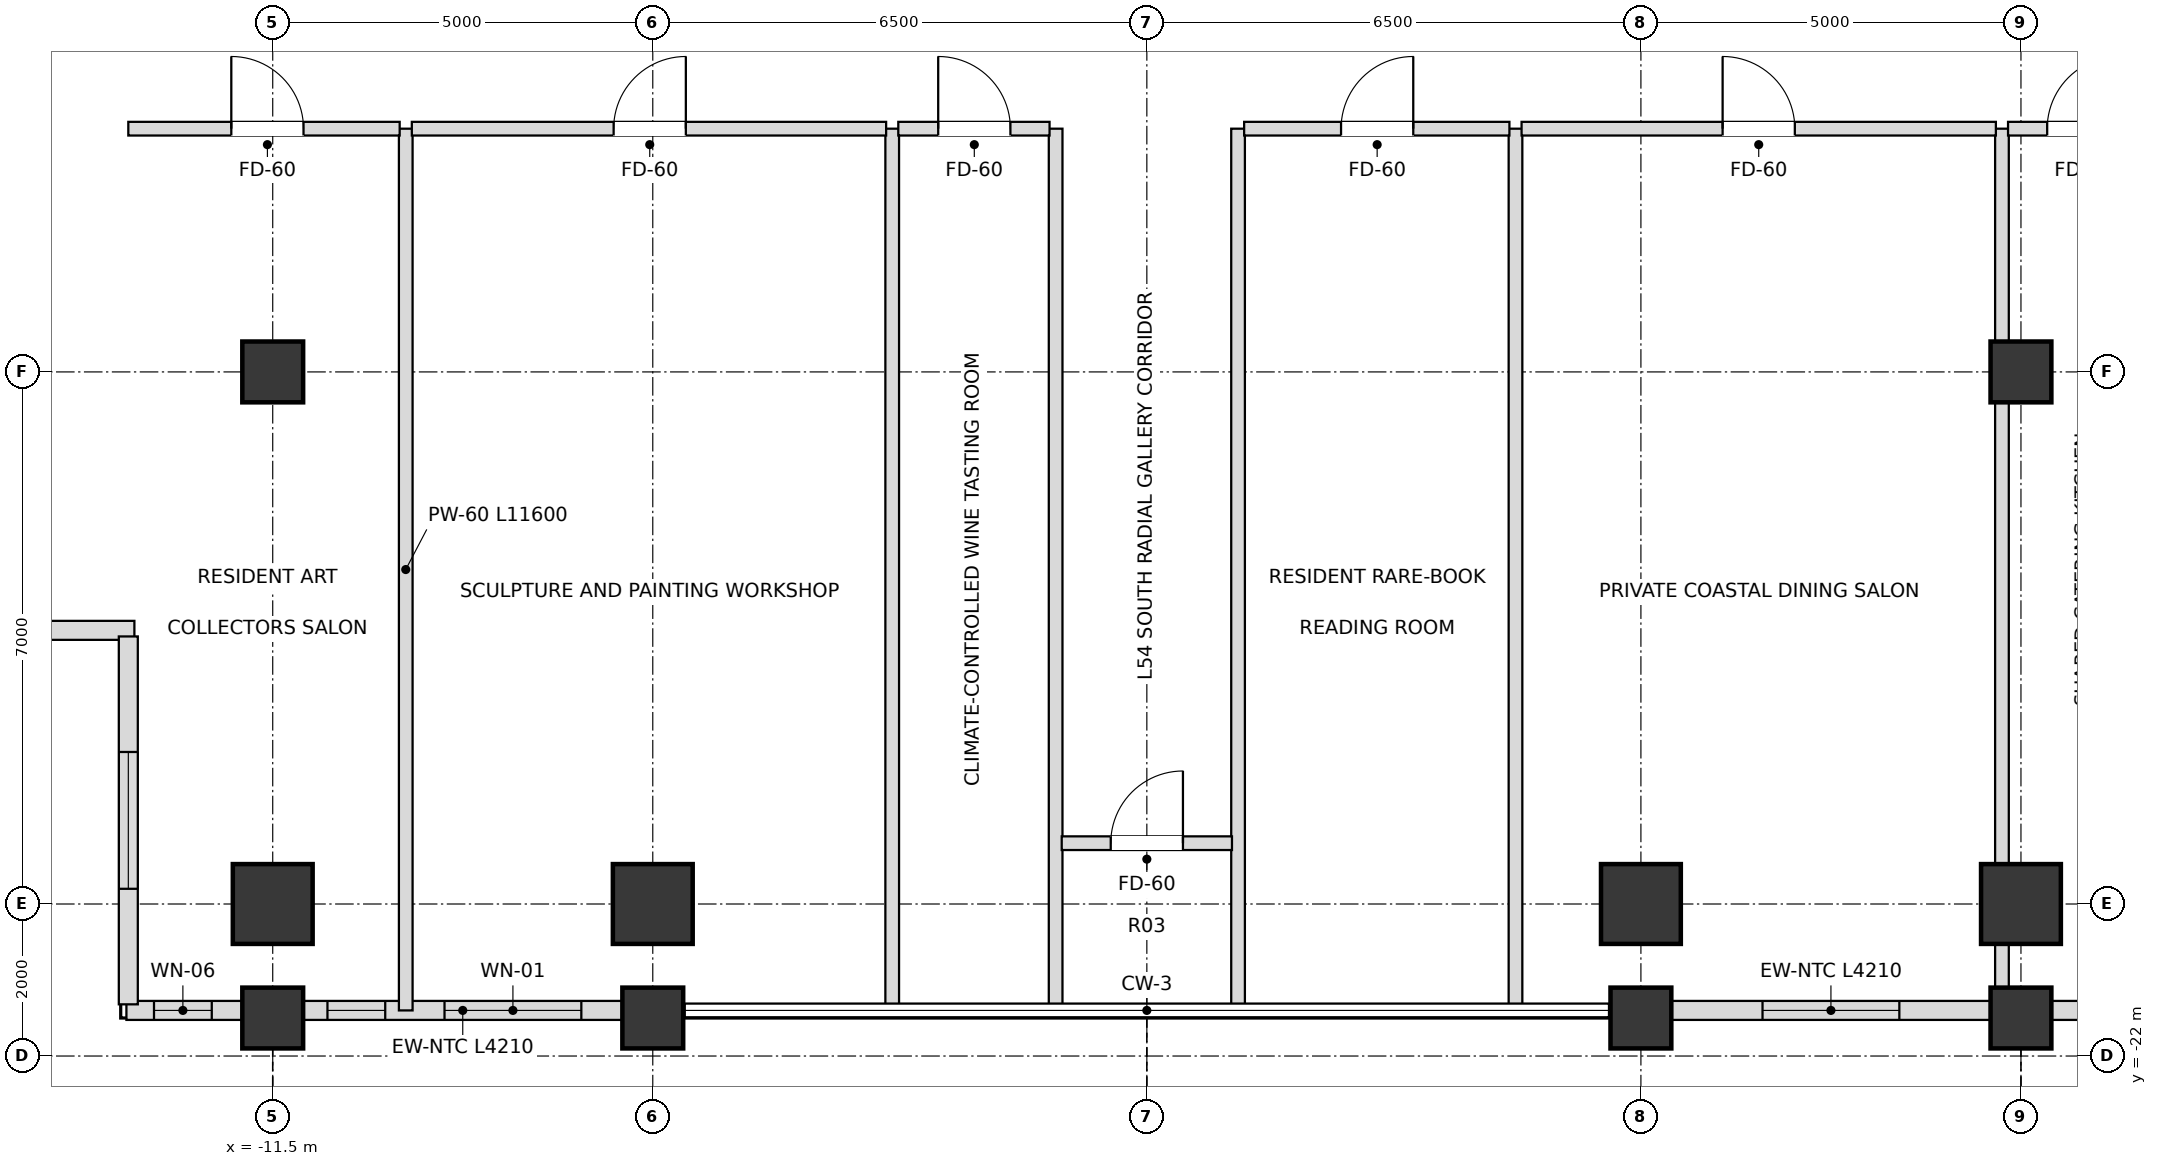
"""IFC4 building model, lengths in metres.
Left out: names, types, materials, properties, quantities, classifications, styles, units other than length and angle.
Written with IfcOpenShell. Run it as: python <this file> out.ifc"""

import sys

from ifc_helpers import new_model, si_unit, direction, frame, frame_2d, origin, origin_2d, place, context, subcontext, project, spatial, rectangle, extrude, element, fill, save


model = new_model("IFC4")
c1 = context("Model", 3, precision=1e-05, world=origin(), true_north=direction((0.0, 1.0)))
c2 = subcontext(c1, "Body", "Model", "MODEL_VIEW")
j1 = project(units=[si_unit("LENGTHUNIT", "METRE"), si_unit("PLANEANGLEUNIT", "RADIAN")], contexts=[c1])
p1 = place(None, origin())
s1 = spatial("IfcSite", under=j1, at=p1, CompositionType="ELEMENT")
p2 = place(p1, origin())
s2 = spatial("IfcBuilding", under=s1, at=p2, CompositionType="ELEMENT")
p3 = place(p2, frame((0.0, 0.0, 208.8)))
s3 = spatial("IfcBuildingStorey", under=s2, at=p3, CompositionType="ELEMENT", Elevation=208.8)
for number, where, z_axis, x_axis in (
    (1, (-11.5, -20.0, 0.0), (0.0, 0.0, 1.0), (1.0, 0.0, 0.0)),
    (2, (-6.5, -20.0, 0.0), (0.0, 0.0, 1.0), (1.0, 0.0, 0.0)),
    (3, (6.5, -20.0, 0.0), (0.0, 0.0, 1.0), (1.0, 0.0, 0.0)),
    (4, (11.5, -20.0, 0.0), (0.0, 0.0, 1.0), (1.0, 0.0, 0.0)),
):
    element("IfcColumn", number, at=place(p3, frame(where, z_axis=z_axis, x_axis=x_axis)), inside=s3, PredefinedType="USERDEFINED", context=c2, shape_type="SweptSolid", body=[
        extrude(rectangle(XDim=1.05, YDim=1.05, at=origin_2d()), origin(), (0.0, 0.0, 1.0), 3.6),
    ])
for number, where, z_axis, x_axis in (
    (5, (-11.5, -13.0, 0.0), (0.0, 0.0, 1.0), (1.0, 0.0, 0.0)),
    (6, (11.5, -13.0, 0.0), (0.0, 0.0, 1.0), (1.0, 0.0, 0.0)),
    (7, (-11.5, -21.5, 0.0), (0.0, 0.0, 1.0), (1.0, 0.0, 0.0)),
    (8, (-6.5, -21.5, 0.0), (0.0, 0.0, 1.0), (1.0, 0.0, 0.0)),
    (9, (6.5, -21.5, 0.0), (0.0, 0.0, 1.0), (1.0, 0.0, 0.0)),
    (10, (11.5, -21.5, 0.0), (0.0, 0.0, 1.0), (1.0, 0.0, 0.0)),
):
    element("IfcColumn", number, at=place(p3, frame(where, z_axis=z_axis, x_axis=x_axis)), inside=s3, PredefinedType="COLUMN", context=c2, shape_type="SweptSolid", body=[
        extrude(rectangle(XDim=0.8, YDim=0.8, at=origin_2d()), origin(), (0.0, 0.0, 1.0), 3.6),
    ])
p4 = place(p3, frame((-13.425, -21.4, 0.0), z_axis=(0.0, 0.0, 1.0), x_axis=(1.0, 0.0, 0.0)))
e11 = element("IfcWall", 11, at=p4, inside=s3, PredefinedType="SOLIDWALL", context=c2, shape_type="SweptSolid", body=[
    extrude(rectangle(XDim=1.53, YDim=0.25, at=frame_2d((0.765, 0.0))), origin(), (0.0, 0.0, 1.0), 2.59),
])
p5 = place(p4, frame((0.363, 0.0, 0.72)))
e12 = element("IfcOpeningElement", 12, at=p5, cuts=e11, PredefinedType="OPENING", context=c2, shape_type="SweptSolid", body=[
    extrude(rectangle(XDim=0.76, YDim=1.68, at=frame_2d((0.38, 0.84))), frame((0.0, 0.135, 0.0), z_axis=(0.0, -1.0, 0.0), x_axis=(1.0, 0.0, 0.0)), (0.0, 0.0, 1.0), 0.27),
])
p6 = place(p3, frame((-11.105, -21.4, 0.0), z_axis=(0.0, 0.0, 1.0), x_axis=(1.0, 0.0, 0.0)))
e13 = element("IfcWall", 13, at=p6, inside=s3, PredefinedType="SOLIDWALL", context=c2, shape_type="SweptSolid", body=[
    extrude(rectangle(XDim=4.21, YDim=0.25, at=frame_2d((2.105, 0.0))), origin(), (0.0, 0.0, 1.0), 2.59),
])
p7 = place(p6, frame((0.325, 0.0, 0.72)))
e14 = element("IfcOpeningElement", 14, at=p7, cuts=e13, PredefinedType="OPENING", context=c2, shape_type="SweptSolid", body=[
    extrude(rectangle(XDim=0.76, YDim=1.68, at=frame_2d((0.38, 0.84))), frame((0.0, 0.135, 0.0), z_axis=(0.0, -1.0, 0.0), x_axis=(1.0, 0.0, 0.0)), (0.0, 0.0, 1.0), 0.27),
])
p8 = place(p6, frame((1.865, 0.0, 0.72)))
e15 = element("IfcOpeningElement", 15, at=p8, cuts=e13, PredefinedType="OPENING", context=c2, shape_type="SweptSolid", body=[
    extrude(rectangle(XDim=1.8, YDim=1.68, at=frame_2d((0.9, 0.84))), frame((0.0, 0.135, 0.0), z_axis=(0.0, -1.0, 0.0), x_axis=(1.0, 0.0, 0.0)), (0.0, 0.0, 1.0), 0.27),
])
p9 = place(p3, frame((6.895, -21.4, 0.0), z_axis=(0.0, 0.0, 1.0), x_axis=(1.0, 0.0, 0.0)))
e16 = element("IfcWall", 16, at=p9, inside=s3, PredefinedType="SOLIDWALL", context=c2, shape_type="SweptSolid", body=[
    extrude(rectangle(XDim=4.21, YDim=0.25, at=frame_2d((2.105, 0.0))), origin(), (0.0, 0.0, 1.0), 2.59),
])
p10 = place(p9, frame((1.205, 0.0, 0.72)))
e17 = element("IfcOpeningElement", 17, at=p10, cuts=e16, PredefinedType="OPENING", context=c2, shape_type="SweptSolid", body=[
    extrude(rectangle(XDim=1.8, YDim=1.68, at=frame_2d((0.9, 0.84))), frame((0.0, 0.135, 0.0), z_axis=(0.0, -1.0, 0.0), x_axis=(1.0, 0.0, 0.0)), (0.0, 0.0, 1.0), 0.27),
])
p11 = place(p3, frame((11.895, -21.4, 0.0), z_axis=(0.0, 0.0, 1.0), x_axis=(1.0, 0.0, 0.0)))
e18 = element("IfcWall", 18, at=p11, inside=s3, PredefinedType="SOLIDWALL", context=c2, shape_type="SweptSolid", body=[
    extrude(rectangle(XDim=1.53, YDim=0.25, at=frame_2d((0.765, 0.0))), origin(), (0.0, 0.0, 1.0), 2.59),
])
p12 = place(p11, frame((0.408, 0.0, 0.72)))
e19 = element("IfcOpeningElement", 19, at=p12, cuts=e18, PredefinedType="OPENING", context=c2, shape_type="SweptSolid", body=[
    extrude(rectangle(XDim=0.76, YDim=1.68, at=frame_2d((0.38, 0.84))), frame((0.0, 0.135, 0.0), z_axis=(0.0, -1.0, 0.0), x_axis=(1.0, 0.0, 0.0)), (0.0, 0.0, 1.0), 0.27),
])
p13 = place(p3, frame((-18.48, -16.4, 0.0), z_axis=(0.0, 0.0, 1.0), x_axis=(1.0, 0.0, 0.0)))
e20 = element("IfcWall", 20, at=p13, inside=s3, PredefinedType="SOLIDWALL", context=c2, shape_type="SweptSolid", body=[
    extrude(rectangle(XDim=5.16, YDim=0.25, at=frame_2d((2.58, 0.0))), origin(), (0.0, 0.0, 1.0), 2.59),
])
p14 = place(p13, frame((1.68, 0.0, 0.72)))
e21 = element("IfcOpeningElement", 21, at=p14, cuts=e20, PredefinedType="OPENING", context=c2, shape_type="SweptSolid", body=[
    extrude(rectangle(XDim=1.8, YDim=1.68, at=frame_2d((0.9, 0.84))), frame((0.0, 0.135, 0.0), z_axis=(0.0, -1.0, 0.0), x_axis=(1.0, 0.0, 0.0)), (0.0, 0.0, 1.0), 0.27),
])
p15 = place(p3, frame((-13.4, -16.48, 0.0), z_axis=(0.0, 0.0, 1.0), x_axis=(0.0, -1.0, 0.0)))
e22 = element("IfcWall", 22, at=p15, inside=s3, PredefinedType="SOLIDWALL", context=c2, shape_type="SweptSolid", body=[
    extrude(rectangle(XDim=4.84, YDim=0.25, at=frame_2d((2.42, 0.0))), origin(), (0.0, 0.0, 1.0), 2.59),
])
p16 = place(p15, frame((1.52, 0.0, 0.72)))
e23 = element("IfcOpeningElement", 23, at=p16, cuts=e22, PredefinedType="OPENING", context=c2, shape_type="SweptSolid", body=[
    extrude(rectangle(XDim=1.8, YDim=1.68, at=frame_2d((0.9, 0.84))), frame((0.0, 0.135, 0.0), z_axis=(0.0, -1.0, 0.0), x_axis=(1.0, 0.0, 0.0)), (0.0, 0.0, 1.0), 0.27),
])
for number, where, z_axis, x_axis in (
    (24, (-9.75, -21.4, 0.0), (0.0, 0.0, 1.0), (0.0, 1.0, 0.0)),
    (25, (-3.35, -21.4, 0.0), (0.0, 0.0, 1.0), (0.0, 1.0, 0.0)),
    (26, (-1.2, -21.4, 0.0), (0.0, 0.0, 1.0), (0.0, 1.0, 0.0)),
    (27, (1.2, -21.4, 0.0), (0.0, 0.0, 1.0), (0.0, 1.0, 0.0)),
    (28, (4.85, -21.4, 0.0), (0.0, 0.0, 1.0), (0.0, 1.0, 0.0)),
):
    element("IfcWall", number, at=place(p3, frame(where, z_axis=z_axis, x_axis=x_axis)), inside=s3, PredefinedType="PARTITIONING", context=c2, shape_type="SweptSolid", body=[
        extrude(rectangle(XDim=11.6, YDim=0.18, at=frame_2d((5.8, 0.0))), origin(), (0.0, 0.0, 1.0), 2.746),
    ])
p17 = place(p3, frame((11.25, -21.4, 0.0), z_axis=(0.0, 0.0, 1.0), x_axis=(0.0, 1.0, 0.0)))
e29 = element("IfcWall", 29, at=p17, inside=s3, PredefinedType="PARTITIONING", context=c2, shape_type="SweptSolid", body=[
    extrude(rectangle(XDim=11.6, YDim=0.18, at=frame_2d((5.8, 0.0))), origin(), (0.0, 0.0, 1.0), 2.59),
])
p18 = place(p3, frame((-1.12, -19.2, 0.0), z_axis=(0.0, 0.0, 1.0), x_axis=(1.0, 0.0, 0.0)))
e30 = element("IfcWall", 30, at=p18, inside=s3, PredefinedType="PARTITIONING", context=c2, shape_type="SweptSolid", body=[
    extrude(rectangle(XDim=2.24, YDim=0.18, at=frame_2d((1.12, 0.0))), origin(), (0.0, 0.0, 1.0), 3.3),
])
p19 = place(p18, frame((0.645, 0.0, 0.0)))
e31 = element("IfcOpeningElement", 31, at=p19, cuts=e30, PredefinedType="OPENING", context=c2, shape_type="SweptSolid", body=[
    extrude(rectangle(XDim=0.95, YDim=2.15, at=frame_2d((0.475, 1.075))), frame((0.0, 0.1, 0.0), z_axis=(0.0, -1.0, 0.0), x_axis=(1.0, 0.0, 0.0)), (0.0, 0.0, 1.0), 0.2),
])
p20 = place(p3, frame((-13.4, -9.8, 0.0), z_axis=(0.0, 0.0, 1.0), x_axis=(1.0, 0.0, 0.0)))
e32 = element("IfcWall", 32, at=p20, inside=s3, PredefinedType="PARTITIONING", context=c2, shape_type="SweptSolid", body=[
    extrude(rectangle(XDim=3.57, YDim=0.18, at=frame_2d((1.785, 0.0))), origin(), (0.0, 0.0, 1.0), 3.3),
])
p21 = place(p20, frame((1.355, 0.0, 0.0)))
e33 = element("IfcOpeningElement", 33, at=p21, cuts=e32, PredefinedType="OPENING", context=c2, shape_type="SweptSolid", body=[
    extrude(rectangle(XDim=0.95, YDim=2.15, at=frame_2d((0.475, 1.075))), frame((0.0, 0.1, 0.0), z_axis=(0.0, -1.0, 0.0), x_axis=(1.0, 0.0, 0.0)), (0.0, 0.0, 1.0), 0.2),
])
p22 = place(p3, frame((-9.67, -9.8, 0.0), z_axis=(0.0, 0.0, 1.0), x_axis=(1.0, 0.0, 0.0)))
e34 = element("IfcWall", 34, at=p22, inside=s3, PredefinedType="PARTITIONING", context=c2, shape_type="SweptSolid", body=[
    extrude(rectangle(XDim=6.24, YDim=0.18, at=frame_2d((3.12, 0.0))), origin(), (0.0, 0.0, 1.0), 2.746),
])
p23 = place(p22, frame((2.655, 0.0, 0.0)))
e35 = element("IfcOpeningElement", 35, at=p23, cuts=e34, PredefinedType="OPENING", context=c2, shape_type="SweptSolid", body=[
    extrude(rectangle(XDim=0.95, YDim=2.15, at=frame_2d((0.475, 1.075))), frame((0.0, 0.1, 0.0), z_axis=(0.0, -1.0, 0.0), x_axis=(1.0, 0.0, 0.0)), (0.0, 0.0, 1.0), 0.2),
])
p24 = place(p3, frame((-3.27, -9.8, 0.0), z_axis=(0.0, 0.0, 1.0), x_axis=(1.0, 0.0, 0.0)))
e36 = element("IfcWall", 36, at=p24, inside=s3, PredefinedType="PARTITIONING", context=c2, shape_type="SweptSolid", body=[
    extrude(rectangle(XDim=1.99, YDim=0.18, at=frame_2d((0.995, 0.0))), origin(), (0.0, 0.0, 1.0), 3.3),
])
p25 = place(p24, frame((0.525, 0.0, 0.0)))
e37 = element("IfcOpeningElement", 37, at=p25, cuts=e36, PredefinedType="OPENING", context=c2, shape_type="SweptSolid", body=[
    extrude(rectangle(XDim=0.95, YDim=2.15, at=frame_2d((0.475, 1.075))), frame((0.0, 0.1, 0.0), z_axis=(0.0, -1.0, 0.0), x_axis=(1.0, 0.0, 0.0)), (0.0, 0.0, 1.0), 0.2),
])
p26 = place(p3, frame((1.28, -9.8, 0.0), z_axis=(0.0, 0.0, 1.0), x_axis=(1.0, 0.0, 0.0)))
e38 = element("IfcWall", 38, at=p26, inside=s3, PredefinedType="PARTITIONING", context=c2, shape_type="SweptSolid", body=[
    extrude(rectangle(XDim=3.49, YDim=0.18, at=frame_2d((1.745, 0.0))), origin(), (0.0, 0.0, 1.0), 3.3),
])
p27 = place(p26, frame((1.275, 0.0, 0.0)))
e39 = element("IfcOpeningElement", 39, at=p27, cuts=e38, PredefinedType="OPENING", context=c2, shape_type="SweptSolid", body=[
    extrude(rectangle(XDim=0.95, YDim=2.15, at=frame_2d((0.475, 1.075))), frame((0.0, 0.1, 0.0), z_axis=(0.0, -1.0, 0.0), x_axis=(1.0, 0.0, 0.0)), (0.0, 0.0, 1.0), 0.2),
])
p28 = place(p3, frame((4.93, -9.8, 0.0), z_axis=(0.0, 0.0, 1.0), x_axis=(1.0, 0.0, 0.0)))
e40 = element("IfcWall", 40, at=p28, inside=s3, PredefinedType="PARTITIONING", context=c2, shape_type="SweptSolid", body=[
    extrude(rectangle(XDim=6.24, YDim=0.18, at=frame_2d((3.12, 0.0))), origin(), (0.0, 0.0, 1.0), 2.746),
])
p29 = place(p28, frame((2.645, 0.0, 0.0)))
e41 = element("IfcOpeningElement", 41, at=p29, cuts=e40, PredefinedType="OPENING", context=c2, shape_type="SweptSolid", body=[
    extrude(rectangle(XDim=0.95, YDim=2.15, at=frame_2d((0.475, 1.075))), frame((0.0, 0.1, 0.0), z_axis=(0.0, -1.0, 0.0), x_axis=(1.0, 0.0, 0.0)), (0.0, 0.0, 1.0), 0.2),
])
p30 = place(p3, frame((11.33, -9.8, 0.0), z_axis=(0.0, 0.0, 1.0), x_axis=(1.0, 0.0, 0.0)))
e42 = element("IfcWall", 42, at=p30, inside=s3, PredefinedType="PARTITIONING", context=c2, shape_type="SweptSolid", body=[
    extrude(rectangle(XDim=2.07, YDim=0.18, at=frame_2d((1.035, 0.0))), origin(), (0.0, 0.0, 1.0), 3.3),
])
p31 = place(p30, frame((0.515, 0.0, 0.0)))
e43 = element("IfcOpeningElement", 43, at=p31, cuts=e42, PredefinedType="OPENING", context=c2, shape_type="SweptSolid", body=[
    extrude(rectangle(XDim=0.95, YDim=2.15, at=frame_2d((0.475, 1.075))), frame((0.0, 0.1, 0.0), z_axis=(0.0, -1.0, 0.0), x_axis=(1.0, 0.0, 0.0)), (0.0, 0.0, 1.0), 0.2),
])
p32 = place(p5, origin())
e44 = element("IfcWindow", 44, at=p32, inside=s3, PartitioningType="SINGLE_PANEL", PredefinedType="WINDOW", context=c2, shape_type="SweptSolid", body=[
    extrude(rectangle(XDim=0.76, YDim=1.68, at=frame_2d((0.38, 0.84))), frame((0.0, 0.03, 0.0), z_axis=(0.0, -1.0, 0.0), x_axis=(1.0, 0.0, 0.0)), (0.0, 0.0, 1.0), 0.06),
])
fill(e12, e44)
p33 = place(p7, origin())
e45 = element("IfcWindow", 45, at=p33, inside=s3, PartitioningType="SINGLE_PANEL", PredefinedType="WINDOW", context=c2, shape_type="SweptSolid", body=[
    extrude(rectangle(XDim=0.76, YDim=1.68, at=frame_2d((0.38, 0.84))), frame((0.0, 0.03, 0.0), z_axis=(0.0, -1.0, 0.0), x_axis=(1.0, 0.0, 0.0)), (0.0, 0.0, 1.0), 0.06),
])
fill(e14, e45)
p34 = place(p8, origin())
e46 = element("IfcWindow", 46, at=p34, inside=s3, PartitioningType="SINGLE_PANEL", PredefinedType="WINDOW", context=c2, shape_type="SweptSolid", body=[
    extrude(rectangle(XDim=1.8, YDim=1.68, at=frame_2d((0.9, 0.84))), frame((0.0, 0.03, 0.0), z_axis=(0.0, -1.0, 0.0), x_axis=(1.0, 0.0, 0.0)), (0.0, 0.0, 1.0), 0.06),
])
fill(e15, e46)
p35 = place(p10, origin())
e47 = element("IfcWindow", 47, at=p35, inside=s3, PartitioningType="SINGLE_PANEL", PredefinedType="WINDOW", context=c2, shape_type="SweptSolid", body=[
    extrude(rectangle(XDim=1.8, YDim=1.68, at=frame_2d((0.9, 0.84))), frame((0.0, 0.03, 0.0), z_axis=(0.0, -1.0, 0.0), x_axis=(1.0, 0.0, 0.0)), (0.0, 0.0, 1.0), 0.06),
])
fill(e17, e47)
p36 = place(p16, origin())
e48 = element("IfcWindow", 48, at=p36, inside=s3, PartitioningType="SINGLE_PANEL", PredefinedType="WINDOW", context=c2, shape_type="SweptSolid", body=[
    extrude(rectangle(XDim=1.8, YDim=1.68, at=frame_2d((0.9, 0.84))), frame((0.0, 0.03, 0.0), z_axis=(0.0, -1.0, 0.0), x_axis=(1.0, 0.0, 0.0)), (0.0, 0.0, 1.0), 0.06),
])
fill(e23, e48)
p37 = place(p19, origin())
e49 = element("IfcDoor", 49, at=p37, inside=s3, OperationType="SINGLE_SWING_RIGHT", PredefinedType="DOOR", context=c2, shape_type="SweptSolid", body=[
    extrude(rectangle(XDim=0.95, YDim=2.15, at=frame_2d((0.475, 1.075))), frame((0.0, 0.025, 0.0), z_axis=(0.0, -1.0, 0.0), x_axis=(1.0, 0.0, 0.0)), (0.0, 0.0, 1.0), 0.05),
])
fill(e31, e49)
p38 = place(p21, origin())
e50 = element("IfcDoor", 50, at=p38, inside=s3, OperationType="SINGLE_SWING_LEFT", PredefinedType="DOOR", context=c2, shape_type="SweptSolid", body=[
    extrude(rectangle(XDim=0.95, YDim=2.15, at=frame_2d((0.475, 1.075))), frame((0.0, 0.025, 0.0), z_axis=(0.0, -1.0, 0.0), x_axis=(1.0, 0.0, 0.0)), (0.0, 0.0, 1.0), 0.05),
])
fill(e33, e50)
p39 = place(p23, origin())
e51 = element("IfcDoor", 51, at=p39, inside=s3, OperationType="SINGLE_SWING_RIGHT", PredefinedType="DOOR", context=c2, shape_type="SweptSolid", body=[
    extrude(rectangle(XDim=0.95, YDim=2.15, at=frame_2d((0.475, 1.075))), frame((0.0, 0.025, 0.0), z_axis=(0.0, -1.0, 0.0), x_axis=(1.0, 0.0, 0.0)), (0.0, 0.0, 1.0), 0.05),
])
fill(e35, e51)
p40 = place(p25, origin())
e52 = element("IfcDoor", 52, at=p40, inside=s3, OperationType="SINGLE_SWING_LEFT", PredefinedType="DOOR", context=c2, shape_type="SweptSolid", body=[
    extrude(rectangle(XDim=0.95, YDim=2.15, at=frame_2d((0.475, 1.075))), frame((0.0, 0.025, 0.0), z_axis=(0.0, -1.0, 0.0), x_axis=(1.0, 0.0, 0.0)), (0.0, 0.0, 1.0), 0.05),
])
fill(e37, e52)
p41 = place(p27, origin())
e53 = element("IfcDoor", 53, at=p41, inside=s3, OperationType="SINGLE_SWING_RIGHT", PredefinedType="DOOR", context=c2, shape_type="SweptSolid", body=[
    extrude(rectangle(XDim=0.95, YDim=2.15, at=frame_2d((0.475, 1.075))), frame((0.0, 0.025, 0.0), z_axis=(0.0, -1.0, 0.0), x_axis=(1.0, 0.0, 0.0)), (0.0, 0.0, 1.0), 0.05),
])
fill(e39, e53)
p42 = place(p29, origin())
e54 = element("IfcDoor", 54, at=p42, inside=s3, OperationType="SINGLE_SWING_LEFT", PredefinedType="DOOR", context=c2, shape_type="SweptSolid", body=[
    extrude(rectangle(XDim=0.95, YDim=2.15, at=frame_2d((0.475, 1.075))), frame((0.0, 0.025, 0.0), z_axis=(0.0, -1.0, 0.0), x_axis=(1.0, 0.0, 0.0)), (0.0, 0.0, 1.0), 0.05),
])
fill(e41, e54)
p43 = place(p31, origin())
e55 = element("IfcDoor", 55, at=p43, inside=s3, OperationType="SINGLE_SWING_RIGHT", PredefinedType="DOOR", context=c2, shape_type="SweptSolid", body=[
    extrude(rectangle(XDim=0.95, YDim=2.15, at=frame_2d((0.475, 1.075))), frame((0.0, 0.025, 0.0), z_axis=(0.0, -1.0, 0.0), x_axis=(1.0, 0.0, 0.0)), (0.0, 0.0, 1.0), 0.05),
])
fill(e43, e55)
save(model, sys.argv[1])
